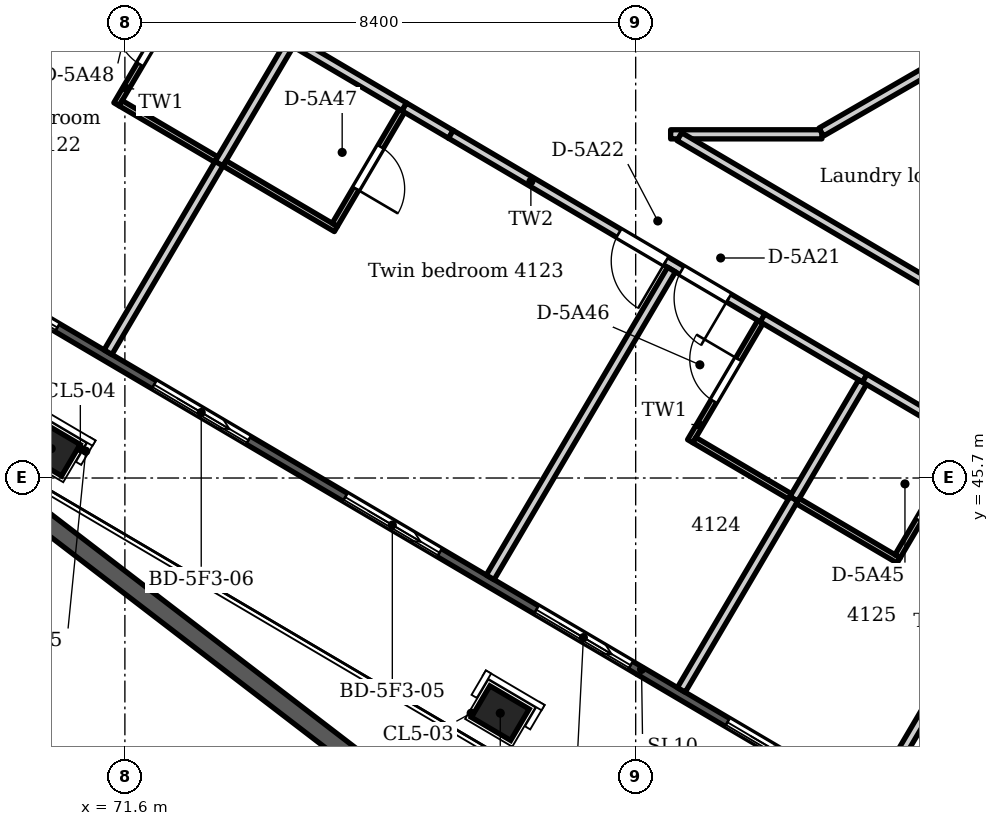
"""IFC4 building model, lengths in metres.
Left out: names, types, materials, properties, quantities, classifications, styles, units other than length and angle.
Written with IfcOpenShell. Run it as: python <this file> out.ifc"""

import sys

from ifc_helpers import new_model, si_unit, direction, frame, frame_2d, origin, origin_2d, place, context, subcontext, project, spatial, polyline, rectangle, outline, extrude, element, fill, save


model = new_model("IFC4")
c1 = context("Model", 3, precision=1e-05, world=origin(), true_north=direction((0.0, 1.0)))
c2 = subcontext(c1, "Body", "Model", "MODEL_VIEW")
j1 = project(units=[si_unit("LENGTHUNIT", "METRE"), si_unit("PLANEANGLEUNIT", "RADIAN")], contexts=[c1])
p1 = place(None, origin())
s1 = spatial("IfcSite", under=j1, at=p1, CompositionType="ELEMENT")
p2 = place(p1, origin())
s2 = spatial("IfcBuilding", under=s1, at=p2, CompositionType="ELEMENT")
p3 = place(p2, frame((0.0, 0.0, 161.1)))
s3 = spatial("IfcBuildingStorey", under=s2, at=p3, CompositionType="ELEMENT", Elevation=161.1)
for number, where, z_axis, x_axis in (
    (1, (77.773, 41.833, -0.35), (0.0, 0.0, 1.0), (-0.862, 0.508, 0.0)),
    (2, (70.388, 46.183, -0.35), (0.0, 0.0, 1.0), (-0.862, 0.508, 0.0)),
):
    element("IfcColumn", number, at=place(p3, frame(where, z_axis=z_axis, x_axis=x_axis)), inside=s3, PredefinedType="COLUMN", context=c2, shape_type="SweptSolid", body=[
        extrude(rectangle(XDim=0.75, YDim=0.6, at=origin_2d()), origin(), (0.0, 0.0, 1.0), 3.95),
    ])
p4 = place(p3, frame((90.139, 36.597, 0.0), z_axis=(0.0, 0.0, 1.0), x_axis=(-0.861630336939, 0.507536365659, 0.0)))
e3 = element("IfcWall", 3, at=p4, inside=s3, PredefinedType="SOLIDWALL", context=c2, shape_type="SweptSolid", body=[
    extrude(outline(polyline([(0.149, 0.075), (0.149, -0.075), (43.617, -0.075), (43.617, 0.075), (0.149, 0.075)])), origin(), (0.0, 0.0, 1.0), 3.3),
])
p5 = place(p4, frame((1.224, 0.0, 0.0)))
e4 = element("IfcOpeningElement", 4, at=p5, cuts=e3, PredefinedType="OPENING", context=c2, shape_type="SweptSolid", body=[
    extrude(rectangle(XDim=1.8, YDim=2.6, at=frame_2d((0.9, 1.3))), frame((0.0, 0.085, 0.0), z_axis=(0.0, -1.0, 0.0), x_axis=(1.0, 0.0, 0.0)), (0.0, 0.0, 1.0), 0.17),
])
p6 = place(p4, frame((4.571, 0.0, 0.0)))
e5 = element("IfcOpeningElement", 5, at=p6, cuts=e3, PredefinedType="OPENING", context=c2, shape_type="SweptSolid", body=[
    extrude(rectangle(XDim=1.8, YDim=2.6, at=frame_2d((0.9, 1.3))), frame((0.0, 0.085, 0.0), z_axis=(0.0, -1.0, 0.0), x_axis=(1.0, 0.0, 0.0)), (0.0, 0.0, 1.0), 0.17),
])
p7 = place(p4, frame((8.218, 0.0, 0.0)))
e6 = element("IfcOpeningElement", 6, at=p7, cuts=e3, PredefinedType="OPENING", context=c2, shape_type="SweptSolid", body=[
    extrude(rectangle(XDim=1.8, YDim=2.6, at=frame_2d((0.9, 1.3))), frame((0.0, 0.085, 0.0), z_axis=(0.0, -1.0, 0.0), x_axis=(1.0, 0.0, 0.0)), (0.0, 0.0, 1.0), 0.17),
])
p8 = place(p4, frame((11.865, 0.0, 0.0)))
e7 = element("IfcOpeningElement", 7, at=p8, cuts=e3, PredefinedType="OPENING", context=c2, shape_type="SweptSolid", body=[
    extrude(rectangle(XDim=1.8, YDim=2.6, at=frame_2d((0.9, 1.3))), frame((0.0, 0.085, 0.0), z_axis=(0.0, -1.0, 0.0), x_axis=(1.0, 0.0, 0.0)), (0.0, 0.0, 1.0), 0.17),
])
p9 = place(p4, frame((15.512, 0.0, 0.0)))
e8 = element("IfcOpeningElement", 8, at=p9, cuts=e3, PredefinedType="OPENING", context=c2, shape_type="SweptSolid", body=[
    extrude(rectangle(XDim=1.8, YDim=2.6, at=frame_2d((0.9, 1.3))), frame((0.0, 0.085, 0.0), z_axis=(0.0, -1.0, 0.0), x_axis=(1.0, 0.0, 0.0)), (0.0, 0.0, 1.0), 0.17),
])
p10 = place(p4, frame((19.16, 0.0, 0.0)))
e9 = element("IfcOpeningElement", 9, at=p10, cuts=e3, PredefinedType="OPENING", context=c2, shape_type="SweptSolid", body=[
    extrude(rectangle(XDim=1.8, YDim=2.6, at=frame_2d((0.9, 1.3))), frame((0.0, 0.085, 0.0), z_axis=(0.0, -1.0, 0.0), x_axis=(1.0, 0.0, 0.0)), (0.0, 0.0, 1.0), 0.17),
])
p11 = place(p4, frame((22.807, 0.0, 0.0)))
e10 = element("IfcOpeningElement", 10, at=p11, cuts=e3, PredefinedType="OPENING", context=c2, shape_type="SweptSolid", body=[
    extrude(rectangle(XDim=1.8, YDim=2.6, at=frame_2d((0.9, 1.3))), frame((0.0, 0.085, 0.0), z_axis=(0.0, -1.0, 0.0), x_axis=(1.0, 0.0, 0.0)), (0.0, 0.0, 1.0), 0.17),
])
p12 = place(p4, frame((26.454, 0.0, 0.0)))
e11 = element("IfcOpeningElement", 11, at=p12, cuts=e3, PredefinedType="OPENING", context=c2, shape_type="SweptSolid", body=[
    extrude(rectangle(XDim=1.8, YDim=2.6, at=frame_2d((0.9, 1.3))), frame((0.0, 0.085, 0.0), z_axis=(0.0, -1.0, 0.0), x_axis=(1.0, 0.0, 0.0)), (0.0, 0.0, 1.0), 0.17),
])
p13 = place(p4, frame((30.101, 0.0, 0.0)))
e12 = element("IfcOpeningElement", 12, at=p13, cuts=e3, PredefinedType="OPENING", context=c2, shape_type="SweptSolid", body=[
    extrude(rectangle(XDim=1.8, YDim=2.6, at=frame_2d((0.9, 1.3))), frame((0.0, 0.085, 0.0), z_axis=(0.0, -1.0, 0.0), x_axis=(1.0, 0.0, 0.0)), (0.0, 0.0, 1.0), 0.17),
])
p14 = place(p4, frame((33.748, 0.0, 0.0)))
e13 = element("IfcOpeningElement", 13, at=p14, cuts=e3, PredefinedType="OPENING", context=c2, shape_type="SweptSolid", body=[
    extrude(rectangle(XDim=1.8, YDim=2.6, at=frame_2d((0.9, 1.3))), frame((0.0, 0.085, 0.0), z_axis=(0.0, -1.0, 0.0), x_axis=(1.0, 0.0, 0.0)), (0.0, 0.0, 1.0), 0.17),
])
p15 = place(p4, frame((37.396, 0.0, 0.0)))
e14 = element("IfcOpeningElement", 14, at=p15, cuts=e3, PredefinedType="OPENING", context=c2, shape_type="SweptSolid", body=[
    extrude(rectangle(XDim=1.8, YDim=2.6, at=frame_2d((0.9, 1.3))), frame((0.0, 0.085, 0.0), z_axis=(0.0, -1.0, 0.0), x_axis=(1.0, 0.0, 0.0)), (0.0, 0.0, 1.0), 0.17),
])
p16 = place(p4, frame((40.743, 0.0, 0.0)))
e15 = element("IfcOpeningElement", 15, at=p16, cuts=e3, PredefinedType="OPENING", context=c2, shape_type="SweptSolid", body=[
    extrude(rectangle(XDim=1.8, YDim=2.6, at=frame_2d((0.9, 1.3))), frame((0.0, 0.085, 0.0), z_axis=(0.0, -1.0, 0.0), x_axis=(1.0, 0.0, 0.0)), (0.0, 0.0, 1.0), 0.17),
])
p17 = place(p3, origin())
e16 = element("IfcWall", 16, at=p17, inside=s3, PredefinedType="PARAPET", context=c2, shape_type="SweptSolid", body=[
    extrude(outline(polyline([(66.115, 48.004), (89.775, 29.849), (89.82, 30.192), (68.236, 46.754), (66.115, 48.004)])), origin(), (0.0, 0.0, 1.0), 1.1),
])
p18 = place(p3, frame((68.179, 49.619, 0.0), z_axis=(0.0, 0.0, 1.0), x_axis=(0.507603061138, 0.861591047031, 0.0)))
e17 = element("IfcWall", 17, at=p18, inside=s3, PredefinedType="PARTITIONING", context=c2, shape_type="SweptSolid", body=[
    extrude(rectangle(XDim=5.874, YDim=0.15, at=frame_2d((2.937, 0.0))), origin(), (0.0, 0.0, 1.0), 3.3),
])
p19 = place(p3, frame((71.322, 47.769, 0.0), z_axis=(0.0, 0.0, 1.0), x_axis=(0.507419363551, 0.861699245383, 0.0)))
e18 = element("IfcWall", 18, at=p19, inside=s3, PredefinedType="PARTITIONING", context=c2, shape_type="SweptSolid", body=[
    extrude(rectangle(XDim=3.688, YDim=0.15, at=frame_2d((1.844, 0.0))), origin(), (0.0, 0.0, 1.0), 3.3),
])
p20 = place(p3, frame((71.462, 51.846, 0.0), z_axis=(0.0, 0.0, 1.0), x_axis=(0.507433164297, 0.861691118541, 0.0)))
e19 = element("IfcWall", 19, at=p20, inside=s3, PredefinedType="PARTITIONING", context=c2, shape_type="SweptSolid", body=[
    extrude(rectangle(XDim=2.273, YDim=0.1, at=frame_2d((1.136, 0.0))), origin(), (0.0, 0.0, 1.0), 3.3),
])
p21 = place(p20, frame((0.761, 0.0, 0.0)))
e20 = element("IfcOpeningElement", 20, at=p21, cuts=e19, PredefinedType="OPENING", context=c2, shape_type="SweptSolid", body=[
    extrude(rectangle(XDim=0.8, YDim=2.1, at=frame_2d((0.4, 1.05))), frame((0.0, 0.06, 0.0), z_axis=(0.0, -1.0, 0.0), x_axis=(1.0, 0.0, 0.0)), (0.0, 0.0, 1.0), 0.12),
])
p22 = place(p3, frame((71.53, 51.864, 0.0), z_axis=(0.0, 0.0, 1.0), x_axis=(0.861772491813, -0.507294955972, 0.0)))
e21 = element("IfcWall", 21, at=p22, inside=s3, PredefinedType="PARTITIONING", context=c2, shape_type="SweptSolid", body=[
    extrude(rectangle(XDim=1.824, YDim=0.1, at=frame_2d((0.912, 0.0))), origin(), (0.0, 0.0, 1.0), 3.3),
])
p23 = place(p3, frame((73.149, 50.87, 0.0), z_axis=(0.0, 0.0, 1.0), x_axis=(0.507882922516, 0.861426106533, 0.0)))
e22 = element("IfcWall", 22, at=p23, inside=s3, PredefinedType="PARTITIONING", context=c2, shape_type="SweptSolid", body=[
    extrude(rectangle(XDim=2.275, YDim=0.15, at=frame_2d((1.137, 0.0))), origin(), (0.0, 0.0, 1.0), 3.3),
])
p24 = place(p3, frame((73.239, 50.875, 0.0), z_axis=(0.0, 0.0, 1.0), x_axis=(0.861529491654, -0.507707529006, 0.0)))
e23 = element("IfcWall", 23, at=p24, inside=s3, PredefinedType="PARTITIONING", context=c2, shape_type="SweptSolid", body=[
    extrude(rectangle(XDim=2.126, YDim=0.1, at=frame_2d((1.063, 0.0))), origin(), (0.0, 0.0, 1.0), 3.3),
])
p25 = place(p3, frame((74.343, 52.893, 0.0), z_axis=(0.0, 0.0, 1.0), x_axis=(0.861685778752, -0.507442231882, 0.0)))
e24 = element("IfcWall", 24, at=p25, inside=s3, PredefinedType="PARTITIONING", context=c2, shape_type="SweptSolid", body=[
    extrude(rectangle(XDim=2.148, YDim=0.15, at=frame_2d((1.074, 0.0))), origin(), (0.0, 0.0, 1.0), 3.3),
])
p26 = place(p3, frame((75.052, 49.864, 0.0), z_axis=(0.0, 0.0, 1.0), x_axis=(0.507363468798, 0.861732157071, 0.0)))
e25 = element("IfcWall", 25, at=p26, inside=s3, PredefinedType="PARTITIONING", context=c2, shape_type="SweptSolid", body=[
    extrude(rectangle(XDim=2.175, YDim=0.1, at=frame_2d((1.087, 0.0))), origin(), (0.0, 0.0, 1.0), 3.3),
])
p27 = place(p26, frame((0.688, 0.0, 0.0)))
e26 = element("IfcOpeningElement", 26, at=p27, cuts=e25, PredefinedType="OPENING", context=c2, shape_type="SweptSolid", body=[
    extrude(rectangle(XDim=0.8, YDim=2.1, at=frame_2d((0.4, 1.05))), frame((0.0, 0.06, 0.0), z_axis=(0.0, -1.0, 0.0), x_axis=(1.0, 0.0, 0.0)), (0.0, 0.0, 1.0), 0.12),
])
p28 = place(p3, frame((76.194, 51.803, 0.0), z_axis=(0.0, 0.0, 1.0), x_axis=(0.861814436452, -0.507223695349, 0.0)))
e27 = element("IfcWall", 27, at=p28, inside=s3, PredefinedType="PARTITIONING", context=c2, shape_type="SweptSolid", body=[
    extrude(rectangle(XDim=0.891, YDim=0.15, at=frame_2d((0.445, 0.0))), origin(), (0.0, 0.0, 1.0), 3.3),
])
p29 = place(p3, frame((76.96, 51.352, 0.0), z_axis=(0.0, 0.0, 1.0), x_axis=(0.861634811964, -0.507528768457, 0.0)))
e28 = element("IfcWall", 28, at=p29, inside=s3, PredefinedType="PARTITIONING", context=c2, shape_type="SweptSolid", body=[
    extrude(rectangle(XDim=5.956, YDim=0.15, at=frame_2d((2.978, 0.0))), origin(), (0.0, 0.0, 1.0), 3.3),
])
p30 = place(p29, frame((4.406, 0.0, 0.0)))
e29 = element("IfcOpeningElement", 29, at=p30, cuts=e28, PredefinedType="OPENING", context=c2, shape_type="SweptSolid", body=[
    extrude(rectangle(XDim=0.9, YDim=2.1, at=frame_2d((0.45, 1.05))), frame((0.0, 0.085, 0.0), z_axis=(0.0, -1.0, 0.0), x_axis=(1.0, 0.0, 0.0)), (0.0, 0.0, 1.0), 0.17),
])
p31 = place(p29, frame((3.206, 0.0, 0.0)))
e30 = element("IfcOpeningElement", 30, at=p31, cuts=e28, PredefinedType="OPENING", context=c2, shape_type="SweptSolid", body=[
    extrude(rectangle(XDim=0.9, YDim=2.1, at=frame_2d((0.45, 1.05))), frame((0.0, 0.085, 0.0), z_axis=(0.0, -1.0, 0.0), x_axis=(1.0, 0.0, 0.0)), (0.0, 0.0, 1.0), 0.17),
])
p32 = place(p3, frame((77.607, 44.066, 0.0), z_axis=(0.0, 0.0, 1.0), x_axis=(0.507572206676, 0.861609224074, 0.0)))
e31 = element("IfcWall", 31, at=p32, inside=s3, PredefinedType="PARTITIONING", context=c2, shape_type="SweptSolid", body=[
    extrude(rectangle(XDim=5.874, YDim=0.15, at=frame_2d((2.937, 0.0))), origin(), (0.0, 0.0, 1.0), 3.3),
])
p33 = place(p3, frame((80.575, 51.352, 0.0), z_axis=(0.0, 0.0, 1.0), x_axis=(1.0, 0.0, 0.0)))
e32 = element("IfcWall", 32, at=p33, inside=s3, PredefinedType="PARTITIONING", context=c2, shape_type="SweptSolid", body=[
    extrude(rectangle(XDim=2.487, YDim=0.15, at=frame_2d((1.244, 0.0))), origin(), (0.0, 0.0, 1.0), 3.3),
])
p34 = place(p3, frame((80.719, 51.314, 0.0), z_axis=(0.0, 0.0, 1.0), x_axis=(0.86168823453, -0.507438061711, 0.0)))
e33 = element("IfcWall", 33, at=p34, inside=s3, PredefinedType="PARTITIONING", context=c2, shape_type="SweptSolid", body=[
    extrude(rectangle(XDim=4.799, YDim=0.15, at=frame_2d((2.399, 0.0))), origin(), (0.0, 0.0, 1.0), 3.3),
])
p35 = place(p3, frame((80.75, 42.216, 0.0), z_axis=(0.0, 0.0, 1.0), x_axis=(0.507590300209, 0.861598564956, 0.0)))
e34 = element("IfcWall", 34, at=p35, inside=s3, PredefinedType="PARTITIONING", context=c2, shape_type="SweptSolid", body=[
    extrude(rectangle(XDim=3.648, YDim=0.15, at=frame_2d((1.824, 0.0))), origin(), (0.0, 0.0, 1.0), 3.3),
])
p36 = place(p3, frame((80.896, 46.306, 0.0), z_axis=(0.0, 0.0, 1.0), x_axis=(0.507376506277, 0.861724480839, 0.0)))
e35 = element("IfcWall", 35, at=p36, inside=s3, PredefinedType="PARTITIONING", context=c2, shape_type="SweptSolid", body=[
    extrude(rectangle(XDim=2.275, YDim=0.1, at=frame_2d((1.138, 0.0))), origin(), (0.0, 0.0, 1.0), 3.3),
])
p37 = place(p36, frame((0.762, 0.0, 0.0)))
e36 = element("IfcOpeningElement", 36, at=p37, cuts=e35, PredefinedType="OPENING", context=c2, shape_type="SweptSolid", body=[
    extrude(rectangle(XDim=0.8, YDim=2.1, at=frame_2d((0.4, 1.05))), frame((0.0, 0.06, 0.0), z_axis=(0.0, -1.0, 0.0), x_axis=(1.0, 0.0, 0.0)), (0.0, 0.0, 1.0), 0.12),
])
p38 = place(p3, frame((80.965, 46.323, 0.0), z_axis=(0.0, 0.0, 1.0), x_axis=(0.861596974365, -0.507593000115, 0.0)))
e37 = element("IfcWall", 37, at=p38, inside=s3, PredefinedType="PARTITIONING", context=c2, shape_type="SweptSolid", body=[
    extrude(rectangle(XDim=1.825, YDim=0.1, at=frame_2d((0.912, 0.0))), origin(), (0.0, 0.0, 1.0), 3.3),
])
p39 = place(p3, frame((82.086, 48.333, 0.0), z_axis=(0.0, 0.0, 1.0), x_axis=(0.861462455733, -0.507821265174, 0.0)))
e38 = element("IfcWall", 38, at=p39, inside=s3, PredefinedType="PARTITIONING", context=c2, shape_type="SweptSolid", body=[
    extrude(rectangle(XDim=1.957, YDim=0.15, at=frame_2d((0.979, 0.0))), origin(), (0.0, 0.0, 1.0), 3.3),
])
p40 = place(p3, frame((82.602, 45.359, 0.0), z_axis=(0.0, 0.0, 1.0), x_axis=(0.507346148222, 0.8617423547, 0.0)))
e39 = element("IfcWall", 39, at=p40, inside=s3, PredefinedType="PARTITIONING", context=c2, shape_type="SweptSolid", body=[
    extrude(rectangle(XDim=2.225, YDim=0.15, at=frame_2d((1.113, 0.0))), origin(), (0.0, 0.0, 1.0), 3.3),
])
p41 = place(p3, frame((82.667, 45.321, 0.0), z_axis=(0.0, 0.0, 1.0), x_axis=(0.861738513716, -0.507352672191, 0.0)))
e40 = element("IfcWall", 40, at=p41, inside=s3, PredefinedType="PARTITIONING", context=c2, shape_type="SweptSolid", body=[
    extrude(rectangle(XDim=1.925, YDim=0.1, at=frame_2d((0.962, 0.0))), origin(), (0.0, 0.0, 1.0), 3.3),
])
p42 = place(p3, frame((83.052, 51.389, 0.0), z_axis=(0.0, 0.0, 1.0), x_axis=(0.866039280689, 0.499975963725, 0.0)))
e41 = element("IfcWall", 41, at=p42, inside=s3, PredefinedType="PARTITIONING", context=c2, shape_type="SweptSolid", body=[
    extrude(rectangle(XDim=5.974, YDim=0.15, at=frame_2d((2.987, 0.0))), origin(), (0.0, 0.0, 1.0), 2.75),
])
p43 = place(p42, frame((2.5, 0.0, 0.0)))
e42 = element("IfcOpeningElement", 42, at=p43, cuts=e41, PredefinedType="OPENING", context=c2, shape_type="SweptSolid", body=[
    extrude(rectangle(XDim=0.9, YDim=2.1, at=frame_2d((0.45, 1.05))), frame((0.0, 0.085, 0.0), z_axis=(0.0, -1.0, 0.0), x_axis=(1.0, 0.0, 0.0)), (0.0, 0.0, 1.0), 0.17),
])
p44 = place(p3, frame((83.766, 47.343, 0.0), z_axis=(0.0, 0.0, 1.0), x_axis=(0.861641853319, -0.507516814115, 0.0)))
e43 = element("IfcWall", 43, at=p44, inside=s3, PredefinedType="PARTITIONING", context=c2, shape_type="SweptSolid", body=[
    extrude(rectangle(XDim=3.651, YDim=0.15, at=frame_2d((1.826, 0.0))), origin(), (0.0, 0.0, 1.0), 3.3),
])
p45 = place(p44, frame((2.601, 0.0, 0.0)))
e44 = element("IfcOpeningElement", 44, at=p45, cuts=e43, PredefinedType="OPENING", context=c2, shape_type="SweptSolid", body=[
    extrude(rectangle(XDim=0.9, YDim=2.1, at=frame_2d((0.45, 1.05))), frame((0.0, 0.085, 0.0), z_axis=(0.0, -1.0, 0.0), x_axis=(1.0, 0.0, 0.0)), (0.0, 0.0, 1.0), 0.17),
])
p46 = place(p3, frame((83.892, 40.365, 0.0), z_axis=(0.0, 0.0, 1.0), x_axis=(0.507590384089, 0.86159851554, 0.0)))
e45 = element("IfcWall", 45, at=p46, inside=s3, PredefinedType="PARTITIONING", context=c2, shape_type="SweptSolid", body=[
    extrude(rectangle(XDim=5.874, YDim=0.15, at=frame_2d((2.937, 0.0))), origin(), (0.0, 0.0, 1.0), 3.3),
])
p47 = place(p3, frame((84.307, 44.413, 0.0), z_axis=(0.0, 0.0, 1.0), x_axis=(0.507559836999, 0.861616510906, 0.0)))
e46 = element("IfcWall", 46, at=p47, inside=s3, PredefinedType="PARTITIONING", context=c2, shape_type="SweptSolid", body=[
    extrude(rectangle(XDim=2.174, YDim=0.1, at=frame_2d((1.087, 0.0))), origin(), (0.0, 0.0, 1.0), 3.3),
])
p48 = place(p47, frame((0.687, 0.0, 0.0)))
e47 = element("IfcOpeningElement", 47, at=p48, cuts=e46, PredefinedType="OPENING", context=c2, shape_type="SweptSolid", body=[
    extrude(rectangle(XDim=0.8, YDim=2.1, at=frame_2d((0.4, 1.05))), frame((0.0, 0.06, 0.0), z_axis=(0.0, -1.0, 0.0), x_axis=(1.0, 0.0, 0.0)), (0.0, 0.0, 1.0), 0.12),
])
p49 = place(p7, origin())
e48 = element("IfcDoor", 48, at=p49, inside=s3, OperationType="SLIDING_TO_LEFT", PredefinedType="DOOR", context=c2, shape_type="SweptSolid", body=[
    extrude(rectangle(XDim=1.8, YDim=2.6, at=frame_2d((0.9, 1.3))), frame((0.0, 0.025, 0.0), z_axis=(0.0, -1.0, 0.0), x_axis=(1.0, 0.0, 0.0)), (0.0, 0.0, 1.0), 0.05),
])
fill(e6, e48)
p50 = place(p8, origin())
e49 = element("IfcDoor", 49, at=p50, inside=s3, OperationType="SLIDING_TO_LEFT", PredefinedType="DOOR", context=c2, shape_type="SweptSolid", body=[
    extrude(rectangle(XDim=1.8, YDim=2.6, at=frame_2d((0.9, 1.3))), frame((0.0, 0.025, 0.0), z_axis=(0.0, -1.0, 0.0), x_axis=(1.0, 0.0, 0.0)), (0.0, 0.0, 1.0), 0.05),
])
fill(e7, e49)
p51 = place(p9, origin())
e50 = element("IfcDoor", 50, at=p51, inside=s3, OperationType="SLIDING_TO_LEFT", PredefinedType="DOOR", context=c2, shape_type="SweptSolid", body=[
    extrude(rectangle(XDim=1.8, YDim=2.6, at=frame_2d((0.9, 1.3))), frame((0.0, 0.025, 0.0), z_axis=(0.0, -1.0, 0.0), x_axis=(1.0, 0.0, 0.0)), (0.0, 0.0, 1.0), 0.05),
])
fill(e8, e50)
p52 = place(p10, origin())
e51 = element("IfcDoor", 51, at=p52, inside=s3, OperationType="SLIDING_TO_LEFT", PredefinedType="DOOR", context=c2, shape_type="SweptSolid", body=[
    extrude(rectangle(XDim=1.8, YDim=2.6, at=frame_2d((0.9, 1.3))), frame((0.0, 0.025, 0.0), z_axis=(0.0, -1.0, 0.0), x_axis=(1.0, 0.0, 0.0)), (0.0, 0.0, 1.0), 0.05),
])
fill(e9, e51)
p53 = place(p11, origin())
e52 = element("IfcDoor", 52, at=p53, inside=s3, OperationType="SLIDING_TO_LEFT", PredefinedType="DOOR", context=c2, shape_type="SweptSolid", body=[
    extrude(rectangle(XDim=1.8, YDim=2.6, at=frame_2d((0.9, 1.3))), frame((0.0, 0.025, 0.0), z_axis=(0.0, -1.0, 0.0), x_axis=(1.0, 0.0, 0.0)), (0.0, 0.0, 1.0), 0.05),
])
fill(e10, e52)
p54 = place(p30, frame((0.9, 0.0, 0.0), z_axis=(0.0, 0.0, 1.0), x_axis=(-1.0, 0.0, 0.0)))
e53 = element("IfcDoor", 53, at=p54, inside=s3, OperationType="SINGLE_SWING_LEFT", PredefinedType="DOOR", context=c2, shape_type="SweptSolid", body=[
    extrude(rectangle(XDim=0.9, YDim=2.1, at=frame_2d((0.45, 1.05))), frame((0.0, 0.025, 0.0), z_axis=(0.0, -1.0, 0.0), x_axis=(1.0, 0.0, 0.0)), (0.0, 0.0, 1.0), 0.05),
])
fill(e29, e53)
p55 = place(p31, frame((0.9, 0.0, 0.0), z_axis=(0.0, 0.0, 1.0), x_axis=(-1.0, 0.0, 0.0)))
e54 = element("IfcDoor", 54, at=p55, inside=s3, OperationType="SINGLE_SWING_LEFT", PredefinedType="DOOR", context=c2, shape_type="SweptSolid", body=[
    extrude(rectangle(XDim=0.9, YDim=2.1, at=frame_2d((0.45, 1.05))), frame((0.0, 0.025, 0.0), z_axis=(0.0, -1.0, 0.0), x_axis=(1.0, 0.0, 0.0)), (0.0, 0.0, 1.0), 0.05),
])
fill(e30, e54)
p56 = place(p48, frame((0.8, 0.0, 0.0), z_axis=(0.0, 0.0, 1.0), x_axis=(-1.0, 0.0, 0.0)))
e55 = element("IfcDoor", 55, at=p56, inside=s3, OperationType="SINGLE_SWING_RIGHT", PredefinedType="DOOR", context=c2, shape_type="SweptSolid", body=[
    extrude(rectangle(XDim=0.8, YDim=2.1, at=frame_2d((0.4, 1.05))), frame((0.0, 0.025, 0.0), z_axis=(0.0, -1.0, 0.0), x_axis=(1.0, 0.0, 0.0)), (0.0, 0.0, 1.0), 0.05),
])
fill(e47, e55)
p57 = place(p37, origin())
e56 = element("IfcDoor", 56, at=p57, inside=s3, OperationType="SINGLE_SWING_RIGHT", PredefinedType="DOOR", context=c2, shape_type="SweptSolid", body=[
    extrude(rectangle(XDim=0.8, YDim=2.1, at=frame_2d((0.4, 1.05))), frame((0.0, 0.025, 0.0), z_axis=(0.0, -1.0, 0.0), x_axis=(1.0, 0.0, 0.0)), (0.0, 0.0, 1.0), 0.05),
])
fill(e36, e56)
p58 = place(p27, frame((0.8, 0.0, 0.0), z_axis=(0.0, 0.0, 1.0), x_axis=(-1.0, 0.0, 0.0)))
e57 = element("IfcDoor", 57, at=p58, inside=s3, OperationType="SINGLE_SWING_RIGHT", PredefinedType="DOOR", context=c2, shape_type="SweptSolid", body=[
    extrude(rectangle(XDim=0.8, YDim=2.1, at=frame_2d((0.4, 1.05))), frame((0.0, 0.025, 0.0), z_axis=(0.0, -1.0, 0.0), x_axis=(1.0, 0.0, 0.0)), (0.0, 0.0, 1.0), 0.05),
])
fill(e26, e57)
p59 = place(p21, origin())
e58 = element("IfcDoor", 58, at=p59, inside=s3, OperationType="SINGLE_SWING_RIGHT", PredefinedType="DOOR", context=c2, shape_type="SweptSolid", body=[
    extrude(rectangle(XDim=0.8, YDim=2.1, at=frame_2d((0.4, 1.05))), frame((0.0, 0.025, 0.0), z_axis=(0.0, -1.0, 0.0), x_axis=(1.0, 0.0, 0.0)), (0.0, 0.0, 1.0), 0.05),
])
fill(e20, e58)
save(model, sys.argv[1])
